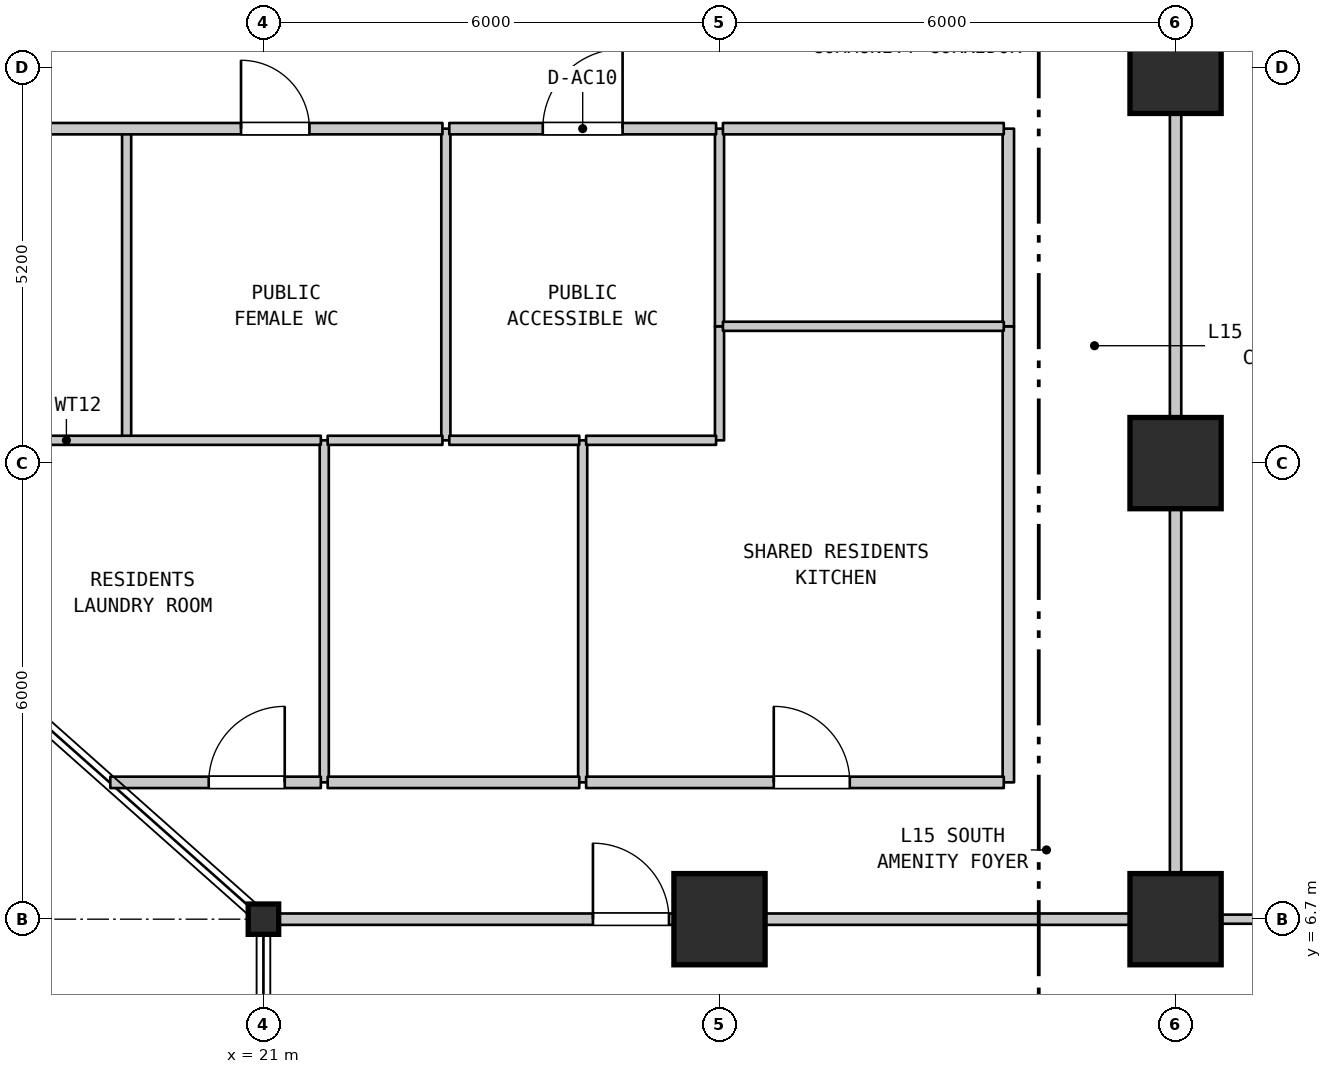
"""IFC4 building model, lengths in metres.
Left out: names, types, materials, properties, quantities, classifications, styles, units other than length and angle.
Written with IfcOpenShell. Run it as: python <this file> out.ifc"""

import sys

from ifc_helpers import new_model, si_unit, direction, frame, frame_2d, origin, origin_2d, place, context, subcontext, project, spatial, rectangle, i_section, extrude, element, fill, save


model = new_model("IFC4")
c1 = context("Model", 3, precision=1e-05, world=origin(), true_north=direction((0.0, 1.0)))
c2 = subcontext(c1, "Body", "Model", "MODEL_VIEW")
j1 = project(units=[si_unit("LENGTHUNIT", "METRE"), si_unit("PLANEANGLEUNIT", "RADIAN")], contexts=[c1])
p1 = place(None, origin())
s1 = spatial("IfcSite", under=j1, at=p1, CompositionType="ELEMENT")
p2 = place(p1, origin())
s2 = spatial("IfcBuilding", under=s1, at=p2, CompositionType="ELEMENT")
p3 = place(p2, frame((0.0, 0.0, 65.6)))
s3 = spatial("IfcBuildingStorey", under=s2, at=p3, CompositionType="ELEMENT", Elevation=65.6)
p4 = place(p3, frame((21.0, 6.7, 0.0), z_axis=(0.0, 0.0, 1.0), x_axis=(1.0, 0.0, 0.0)))
e1 = element("IfcColumn", 1, at=p4, inside=s3, PredefinedType="COLUMN", context=c2, shape_type="SweptSolid", body=[
    extrude(i_section(OverallWidth=0.401, OverallDepth=0.399, WebThickness=0.025, FlangeThickness=0.04, FilletRadius=0.015, at=origin_2d()), origin(), (0.0, 0.0, 1.0), 4.5),
])
for number, where, z_axis, x_axis in (
    (2, (27.0, 6.7, 0.0), (0.0, 0.0, 1.0), (1.0, 0.0, 0.0)),
    (3, (33.0, 6.7, 0.0), (0.0, 0.0, 1.0), (1.0, 0.0, 0.0)),
    (4, (33.0, 12.7, 0.0), (0.0, 0.0, 1.0), (1.0, 0.0, 0.0)),
    (5, (33.0, 17.9, 0.0), (0.0, 0.0, 1.0), (1.0, 0.0, 0.0)),
):
    element("IfcColumn", number, at=place(p3, frame(where, z_axis=z_axis, x_axis=x_axis)), inside=s3, PredefinedType="COLUMN", context=c2, shape_type="SweptSolid", body=[
        extrude(rectangle(XDim=1.2, YDim=1.2, at=origin_2d()), origin(), (0.0, 0.0, 1.0), 4.5),
    ])
p5 = place(p3, frame((19.2, 13.0, 0.0), z_axis=(0.0, 0.0, 1.0), x_axis=(0.0, 1.0, 0.0)))
e6 = element("IfcWall", 6, at=p5, inside=s3, PredefinedType="PARTITIONING", context=c2, shape_type="SweptSolid", body=[
    extrude(rectangle(XDim=4.1, YDim=0.12, at=frame_2d((2.05, 0.0))), origin(), (0.0, 0.0, 1.0), 4.185),
])
p6 = place(p3, frame((21.8, 8.5, 0.0), z_axis=(0.0, 0.0, 1.0), x_axis=(0.0, 1.0, 0.0)))
e7 = element("IfcWall", 7, at=p6, inside=s3, PredefinedType="PARTITIONING", context=c2, shape_type="SweptSolid", body=[
    extrude(rectangle(XDim=4.5, YDim=0.12, at=frame_2d((2.25, 0.0))), origin(), (0.0, 0.0, 1.0), 4.185),
])
p7 = place(p3, frame((23.4, 13.0, 0.0), z_axis=(0.0, 0.0, 1.0), x_axis=(0.0, 1.0, 0.0)))
e8 = element("IfcWall", 8, at=p7, inside=s3, PredefinedType="PARTITIONING", context=c2, shape_type="SweptSolid", body=[
    extrude(rectangle(XDim=4.1, YDim=0.12, at=frame_2d((2.05, 0.0))), origin(), (0.0, 0.0, 1.0), 4.185),
])
p8 = place(p3, frame((25.2, 8.5, 0.0), z_axis=(0.0, 0.0, 1.0), x_axis=(0.0, 1.0, 0.0)))
e9 = element("IfcWall", 9, at=p8, inside=s3, PredefinedType="PARTITIONING", context=c2, shape_type="SweptSolid", body=[
    extrude(rectangle(XDim=4.5, YDim=0.12, at=frame_2d((2.25, 0.0))), origin(), (0.0, 0.0, 1.0), 4.185),
])
p9 = place(p3, frame((27.0, 13.0, 0.0), z_axis=(0.0, 0.0, 1.0), x_axis=(0.0, 1.0, 0.0)))
e10 = element("IfcWall", 10, at=p9, inside=s3, PredefinedType="PARTITIONING", context=c2, shape_type="SweptSolid", body=[
    extrude(rectangle(XDim=1.5, YDim=0.12, at=frame_2d((0.75, 0.0))), origin(), (0.0, 0.0, 1.0), 4.185),
])
p10 = place(p3, frame((27.0, 14.5, 0.0), z_axis=(0.0, 0.0, 1.0), x_axis=(0.0, 1.0, 0.0)))
e11 = element("IfcWall", 11, at=p10, inside=s3, PredefinedType="PARTITIONING", context=c2, shape_type="SweptSolid", body=[
    extrude(rectangle(XDim=2.6, YDim=0.12, at=frame_2d((1.3, 0.0))), origin(), (0.0, 0.0, 1.0), 4.185),
])
p11 = place(p3, frame((30.8, 8.5, 0.0), z_axis=(0.0, 0.0, 1.0), x_axis=(0.0, 1.0, 0.0)))
e12 = element("IfcWall", 12, at=p11, inside=s3, PredefinedType="STANDARD", context=c2, shape_type="SweptSolid", body=[
    extrude(rectangle(XDim=6.0, YDim=0.15, at=frame_2d((3.0, 0.0))), origin(), (0.0, 0.0, 1.0), 4.185),
])
p12 = place(p3, frame((30.8, 14.5, 0.0), z_axis=(0.0, 0.0, 1.0), x_axis=(0.0, 1.0, 0.0)))
e13 = element("IfcWall", 13, at=p12, inside=s3, PredefinedType="STANDARD", context=c2, shape_type="SweptSolid", body=[
    extrude(rectangle(XDim=2.6, YDim=0.15, at=frame_2d((1.3, 0.0))), origin(), (0.0, 0.0, 1.0), 4.185),
])
p13 = place(p3, frame((33.0, 6.7, 0.0), z_axis=(0.0, 0.0, 1.0), x_axis=(0.0, 1.0, 0.0)))
e14 = element("IfcWall", 14, at=p13, inside=s3, PredefinedType="STANDARD", context=c2, shape_type="SweptSolid", body=[
    extrude(rectangle(XDim=19.2, YDim=0.15, at=frame_2d((9.6, 0.0))), origin(), (0.0, 0.0, 1.0), 3.685),
])
p14 = place(p3, frame((21.01, 6.7, 0.0), z_axis=(0.0, 0.0, 1.0), x_axis=(1.0, 0.0, 0.0)))
e15 = element("IfcWall", 15, at=p14, inside=s3, PredefinedType="STANDARD", context=c2, shape_type="SweptSolid", body=[
    extrude(rectangle(XDim=11.93, YDim=0.15, at=frame_2d((5.965, 0.0))), origin(), (0.0, 0.0, 1.0), 3.685),
])
p15 = place(p14, frame((4.325, 0.0, 0.0)))
e16 = element("IfcOpeningElement", 16, at=p15, cuts=e15, PredefinedType="OPENING", context=c2, shape_type="SweptSolid", body=[
    extrude(rectangle(XDim=1.0, YDim=2.15, at=frame_2d((0.5, 1.075))), frame((0.0, 0.085, 0.0), z_axis=(0.0, -1.0, 0.0), x_axis=(1.0, 0.0, 0.0)), (0.0, 0.0, 1.0), 0.17),
])
p16 = place(p3, frame((33.06, 6.7, 0.0), z_axis=(0.0, 0.0, 1.0), x_axis=(1.0, 0.0, 0.0)))
e17 = element("IfcWall", 17, at=p16, inside=s3, PredefinedType="PARTITIONING", context=c2, shape_type="SweptSolid", body=[
    extrude(rectangle(XDim=5.94, YDim=0.12, at=frame_2d((2.97, 0.0))), origin(), (0.0, 0.0, 1.0), 3.685),
])
p17 = place(p3, frame((18.985, 8.5, 0.0), z_axis=(0.0, 0.0, 1.0), x_axis=(1.0, 0.0, 0.0)))
e18 = element("IfcWall", 18, at=p17, inside=s3, PredefinedType="STANDARD", context=c2, shape_type="SweptSolid", body=[
    extrude(rectangle(XDim=2.77, YDim=0.15, at=frame_2d((1.385, 0.0))), origin(), (0.0, 0.0, 1.0), 4.185),
])
p18 = place(p17, frame((1.295, 0.0, 0.0)))
e19 = element("IfcOpeningElement", 19, at=p18, cuts=e18, PredefinedType="OPENING", context=c2, shape_type="SweptSolid", body=[
    extrude(rectangle(XDim=1.0, YDim=2.15, at=frame_2d((0.5, 1.075))), frame((0.0, 0.085, 0.0), z_axis=(0.0, -1.0, 0.0), x_axis=(1.0, 0.0, 0.0)), (0.0, 0.0, 1.0), 0.17),
])
p19 = place(p3, frame((21.845, 8.5, 0.0), z_axis=(0.0, 0.0, 1.0), x_axis=(1.0, 0.0, 0.0)))
e20 = element("IfcWall", 20, at=p19, inside=s3, PredefinedType="STANDARD", context=c2, shape_type="SweptSolid", body=[
    extrude(rectangle(XDim=3.31, YDim=0.15, at=frame_2d((1.655, 0.0))), origin(), (0.0, 0.0, 1.0), 4.185),
])
p20 = place(p3, frame((25.245, 8.5, 0.0), z_axis=(0.0, 0.0, 1.0), x_axis=(1.0, 0.0, 0.0)))
e21 = element("IfcWall", 21, at=p20, inside=s3, PredefinedType="STANDARD", context=c2, shape_type="SweptSolid", body=[
    extrude(rectangle(XDim=5.495, YDim=0.15, at=frame_2d((2.748, 0.0))), origin(), (0.0, 0.0, 1.0), 4.185),
])
p21 = place(p20, frame((2.469, 0.0, 0.0)))
e22 = element("IfcOpeningElement", 22, at=p21, cuts=e21, PredefinedType="OPENING", context=c2, shape_type="SweptSolid", body=[
    extrude(rectangle(XDim=1.0, YDim=2.15, at=frame_2d((0.5, 1.075))), frame((0.0, 0.085, 0.0), z_axis=(0.0, -1.0, 0.0), x_axis=(1.0, 0.0, 0.0)), (0.0, 0.0, 1.0), 0.17),
])
p22 = place(p3, frame((15.06, 13.0, 0.0), z_axis=(0.0, 0.0, 1.0), x_axis=(1.0, 0.0, 0.0)))
e23 = element("IfcWall", 23, at=p22, inside=s3, PredefinedType="PARTITIONING", context=c2, shape_type="SweptSolid", body=[
    extrude(rectangle(XDim=6.695, YDim=0.12, at=frame_2d((3.347, 0.0))), origin(), (0.0, 0.0, 1.0), 4.185),
])
p23 = place(p3, frame((21.845, 13.0, 0.0), z_axis=(0.0, 0.0, 1.0), x_axis=(1.0, 0.0, 0.0)))
e24 = element("IfcWall", 24, at=p23, inside=s3, PredefinedType="PARTITIONING", context=c2, shape_type="SweptSolid", body=[
    extrude(rectangle(XDim=1.51, YDim=0.12, at=frame_2d((0.755, 0.0))), origin(), (0.0, 0.0, 1.0), 4.185),
])
for number, where, z_axis, x_axis in (
    (25, (23.445, 13.0, 0.0), (0.0, 0.0, 1.0), (1.0, 0.0, 0.0)),
    (26, (25.245, 13.0, 0.0), (0.0, 0.0, 1.0), (1.0, 0.0, 0.0)),
):
    element("IfcWall", number, at=place(p3, frame(where, z_axis=z_axis, x_axis=x_axis)), inside=s3, PredefinedType="PARTITIONING", context=c2, shape_type="SweptSolid", body=[
        extrude(rectangle(XDim=1.71, YDim=0.12, at=frame_2d((0.855, 0.0))), origin(), (0.0, 0.0, 1.0), 4.185),
    ])
p24 = place(p3, frame((27.045, 14.5, 0.0), z_axis=(0.0, 0.0, 1.0), x_axis=(1.0, 0.0, 0.0)))
e27 = element("IfcWall", 27, at=p24, inside=s3, PredefinedType="PARTITIONING", context=c2, shape_type="SweptSolid", body=[
    extrude(rectangle(XDim=3.695, YDim=0.12, at=frame_2d((1.848, 0.0))), origin(), (0.0, 0.0, 1.0), 4.185),
])
p25 = place(p3, frame((15.06, 17.1, 0.0), z_axis=(0.0, 0.0, 1.0), x_axis=(1.0, 0.0, 0.0)))
e28 = element("IfcWall", 28, at=p25, inside=s3, PredefinedType="STANDARD", context=c2, shape_type="SweptSolid", body=[
    extrude(rectangle(XDim=8.295, YDim=0.15, at=frame_2d((4.147, 0.0))), origin(), (0.0, 0.0, 1.0), 4.185),
])
p26 = place(p25, frame((1.595, 0.0, 0.0)))
e29 = element("IfcOpeningElement", 29, at=p26, cuts=e28, PredefinedType="OPENING", context=c2, shape_type="SweptSolid", body=[
    extrude(rectangle(XDim=0.9, YDim=2.1, at=frame_2d((0.45, 1.05))), frame((0.0, 0.085, 0.0), z_axis=(0.0, -1.0, 0.0), x_axis=(1.0, 0.0, 0.0)), (0.0, 0.0, 1.0), 0.17),
])
p27 = place(p25, frame((5.645, 0.0, 0.0)))
e30 = element("IfcOpeningElement", 30, at=p27, cuts=e28, PredefinedType="OPENING", context=c2, shape_type="SweptSolid", body=[
    extrude(rectangle(XDim=0.9, YDim=2.1, at=frame_2d((0.45, 1.05))), frame((0.0, 0.085, 0.0), z_axis=(0.0, -1.0, 0.0), x_axis=(1.0, 0.0, 0.0)), (0.0, 0.0, 1.0), 0.17),
])
p28 = place(p3, frame((23.445, 17.1, 0.0), z_axis=(0.0, 0.0, 1.0), x_axis=(1.0, 0.0, 0.0)))
e31 = element("IfcWall", 31, at=p28, inside=s3, PredefinedType="STANDARD", context=c2, shape_type="SweptSolid", body=[
    extrude(rectangle(XDim=3.51, YDim=0.15, at=frame_2d((1.755, 0.0))), origin(), (0.0, 0.0, 1.0), 4.185),
])
p29 = place(p28, frame((1.23, 0.0, 0.0)))
e32 = element("IfcOpeningElement", 32, at=p29, cuts=e31, PredefinedType="OPENING", context=c2, shape_type="SweptSolid", body=[
    extrude(rectangle(XDim=1.05, YDim=2.15, at=frame_2d((0.525, 1.075))), frame((0.0, 0.085, 0.0), z_axis=(0.0, -1.0, 0.0), x_axis=(1.0, 0.0, 0.0)), (0.0, 0.0, 1.0), 0.17),
])
p30 = place(p3, frame((27.045, 17.1, 0.0), z_axis=(0.0, 0.0, 1.0), x_axis=(1.0, 0.0, 0.0)))
e33 = element("IfcWall", 33, at=p30, inside=s3, PredefinedType="STANDARD", context=c2, shape_type="SweptSolid", body=[
    extrude(rectangle(XDim=3.695, YDim=0.15, at=frame_2d((1.848, 0.0))), origin(), (0.0, 0.0, 1.0), 4.185),
])
p31 = place(p15, origin())
e34 = element("IfcDoor", 34, at=p31, inside=s3, OperationType="SINGLE_SWING_LEFT", PredefinedType="DOOR", context=c2, shape_type="SweptSolid", body=[
    extrude(rectangle(XDim=1.0, YDim=2.15, at=frame_2d((0.5, 1.075))), frame((0.0, 0.025, 0.0), z_axis=(0.0, -1.0, 0.0), x_axis=(1.0, 0.0, 0.0)), (0.0, 0.0, 1.0), 0.05),
])
fill(e16, e34)
p32 = place(p18, origin())
e35 = element("IfcDoor", 35, at=p32, inside=s3, OperationType="SINGLE_SWING_RIGHT", PredefinedType="DOOR", context=c2, shape_type="SweptSolid", body=[
    extrude(rectangle(XDim=1.0, YDim=2.15, at=frame_2d((0.5, 1.075))), frame((0.0, 0.025, 0.0), z_axis=(0.0, -1.0, 0.0), x_axis=(1.0, 0.0, 0.0)), (0.0, 0.0, 1.0), 0.05),
])
fill(e19, e35)
p33 = place(p21, origin())
e36 = element("IfcDoor", 36, at=p33, inside=s3, OperationType="SINGLE_SWING_LEFT", PredefinedType="DOOR", context=c2, shape_type="SweptSolid", body=[
    extrude(rectangle(XDim=1.0, YDim=2.15, at=frame_2d((0.5, 1.075))), frame((0.0, 0.025, 0.0), z_axis=(0.0, -1.0, 0.0), x_axis=(1.0, 0.0, 0.0)), (0.0, 0.0, 1.0), 0.05),
])
fill(e22, e36)
p34 = place(p27, origin())
e37 = element("IfcDoor", 37, at=p34, inside=s3, OperationType="SINGLE_SWING_LEFT", PredefinedType="DOOR", context=c2, shape_type="SweptSolid", body=[
    extrude(rectangle(XDim=0.9, YDim=2.1, at=frame_2d((0.45, 1.05))), frame((0.0, 0.025, 0.0), z_axis=(0.0, -1.0, 0.0), x_axis=(1.0, 0.0, 0.0)), (0.0, 0.0, 1.0), 0.05),
])
fill(e30, e37)
p35 = place(p29, origin())
e38 = element("IfcDoor", 38, at=p35, inside=s3, OperationType="SINGLE_SWING_RIGHT", PredefinedType="DOOR", context=c2, shape_type="SweptSolid", body=[
    extrude(rectangle(XDim=1.05, YDim=2.15, at=frame_2d((0.525, 1.075))), frame((0.0, 0.025, 0.0), z_axis=(0.0, -1.0, 0.0), x_axis=(1.0, 0.0, 0.0)), (0.0, 0.0, 1.0), 0.05),
])
fill(e32, e38)
save(model, sys.argv[1])
